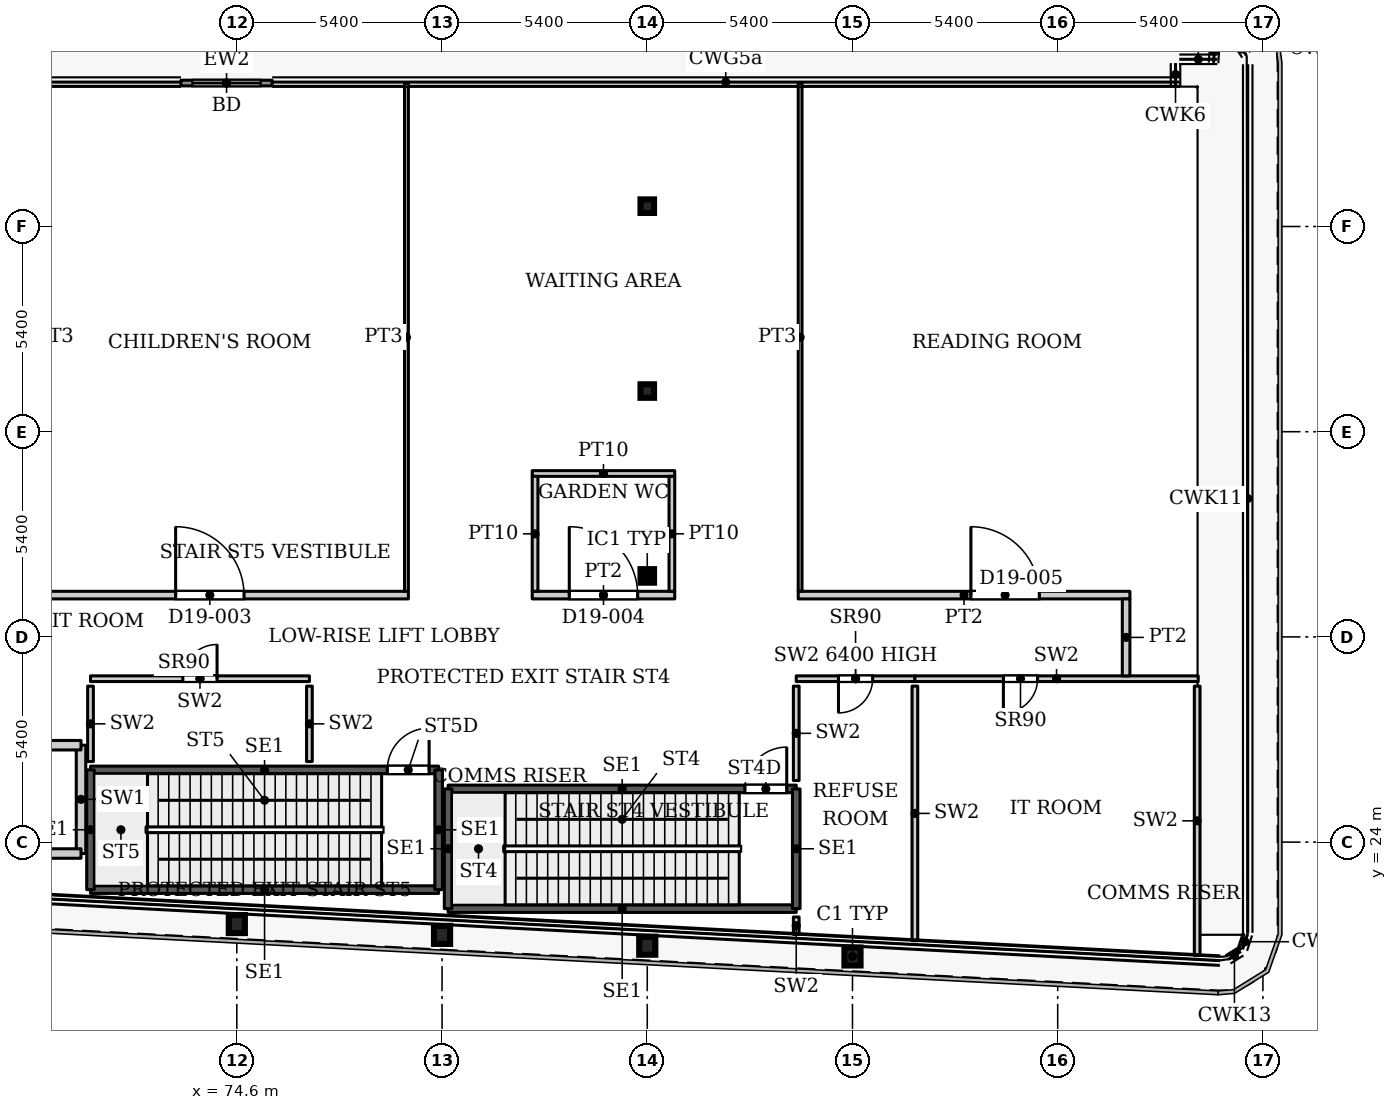
"""IFC4 building model, lengths in metres.
Left out: names, types, materials, properties, quantities, classifications, styles, units other than length and angle.
Written with IfcOpenShell. Run it as: python <this file> out.ifc"""

import sys

from ifc_helpers import new_model, si_unit, direction, frame, frame_2d, origin, origin_2d, place, context, subcontext, project, spatial, rectangle, hollow_rectangle, i_section, extrude, source, transform, mapped, element, fill, save


model = new_model("IFC4")
c1 = context("Model", 3, precision=1e-05, world=origin(), true_north=direction((0.0, 1.0)))
c2 = subcontext(c1, "Body", "Model", "MODEL_VIEW")
j1 = project(units=[si_unit("LENGTHUNIT", "METRE"), si_unit("PLANEANGLEUNIT", "RADIAN")], contexts=[c1])
p1 = place(None, origin())
s1 = spatial("IfcSite", under=j1, at=p1, CompositionType="ELEMENT")
p2 = place(p1, origin())
s2 = spatial("IfcBuilding", under=s1, at=p2, CompositionType="ELEMENT")
p3 = place(p2, frame((0.0, 0.0, 81.2)))
s3 = spatial("IfcBuildingStorey", under=s2, at=p3, CompositionType="ELEMENT", Elevation=81.2)
for number, where, z_axis, x_axis in (
    (1, (90.8, 20.99, 0.0), (0.0, 0.0, 1.0), (1.0, 0.0, 0.0)),
    (2, (85.4, 21.274, 0.0), (0.0, 0.0, 1.0), (1.0, 0.0, 0.0)),
    (3, (80.0, 21.558, 0.0), (0.0, 0.0, 1.0), (1.0, 0.0, 0.0)),
    (4, (74.6, 21.843, 0.0), (0.0, 0.0, 1.0), (1.0, 0.0, 0.0)),
):
    element("IfcColumn", number, at=place(p3, frame(where, z_axis=z_axis, x_axis=x_axis)), inside=s3, PredefinedType="COLUMN", context=c2, shape_type="SweptSolid", body=[
        extrude(i_section(OverallWidth=0.424, OverallDepth=0.474, WebThickness=0.048, FlangeThickness=0.077, FilletRadius=0.014, at=origin_2d()), origin(), (0.0, 0.0, 1.0), 7.8),
    ])
for number, where, z_axis, x_axis in (
    (5, (85.4, 31.005, 0.0), (0.0, 0.0, 1.0), (1.0, 0.0, 0.0)),
    (6, (85.4, 35.87, 0.0), (0.0, 0.0, 1.0), (1.0, 0.0, 0.0)),
    (7, (85.4, 40.735, 0.0), (0.0, 0.0, 1.0), (1.0, 0.0, 0.0)),
):
    element("IfcColumn", number, at=place(p3, frame(where, z_axis=z_axis, x_axis=x_axis)), inside=s3, PredefinedType="COLUMN", context=c2, shape_type="SweptSolid", body=[
        extrude(hollow_rectangle(XDim=0.356, YDim=0.356, WallThickness=0.016, InnerFilletRadius=0.016, OuterFilletRadius=0.032, at=origin_2d()), origin(), (0.0, 0.0, 1.0), 7.8),
    ])
p4 = place(p3, frame((73.13, 43.975, 0.0), z_axis=(0.0, 0.0, 1.0), x_axis=(1.0, 0.0, 0.0)))
e8 = element("IfcWall", 8, at=p4, inside=s3, PredefinedType="SOLIDWALL", context=c2, shape_type="SweptSolid", body=[
    extrude(rectangle(XDim=2.4, YDim=0.15, at=frame_2d((1.2, 0.0))), origin(), (0.0, 0.0, 1.0), 7.65),
])
p5 = place(p4, frame((0.3, 0.0, 0.0)))
e9 = element("IfcOpeningElement", 9, at=p5, cuts=e8, PredefinedType="OPENING", context=c2, shape_type="SweptSolid", body=[
    extrude(rectangle(XDim=1.8, YDim=2.4, at=frame_2d((0.9, 1.2))), frame((0.0, 0.085, 0.0), z_axis=(0.0, -1.0, 0.0), x_axis=(1.0, 0.0, 0.0)), (0.0, 0.0, 1.0), 0.17),
])
p6 = place(p3, frame((80.16, 22.25, 0.0), z_axis=(0.0, 0.0, 1.0), x_axis=(1.0, 0.0, 0.0)))
e10 = element("IfcWall", 10, at=p6, inside=s3, PredefinedType="SHEAR", context=c2, shape_type="SweptSolid", body=[
    extrude(rectangle(XDim=9.16, YDim=0.2, at=frame_2d((4.58, 0.0))), origin(), (0.0, 0.0, 1.0), 7.8),
])
p7 = place(p3, frame((80.16, 25.4, 0.0), z_axis=(0.0, 0.0, 1.0), x_axis=(1.0, 0.0, 0.0)))
e11 = element("IfcWall", 11, at=p7, inside=s3, PredefinedType="SHEAR", context=c2, shape_type="SweptSolid", body=[
    extrude(rectangle(XDim=9.16, YDim=0.2, at=frame_2d((4.58, 0.0))), origin(), (0.0, 0.0, 1.0), 7.8),
])
p8 = place(p7, frame((7.81, 0.0, 0.0)))
e12 = element("IfcOpeningElement", 12, at=p8, cuts=e11, PredefinedType="OPENING", context=c2, shape_type="SweptSolid", body=[
    extrude(rectangle(XDim=1.1, YDim=2.2, at=frame_2d((0.55, 1.1))), frame((0.0, 0.11, 0.0), z_axis=(0.0, -1.0, 0.0), x_axis=(1.0, 0.0, 0.0)), (0.0, 0.0, 1.0), 0.22),
])
for number, where, z_axis, x_axis in (
    (13, (80.16, 22.25, 0.0), (0.0, 0.0, 1.0), (0.0, 1.0, 0.0)),
    (14, (89.32, 22.25, 0.0), (0.0, 0.0, 1.0), (0.0, 1.0, 0.0)),
):
    element("IfcWall", number, at=place(p3, frame(where, z_axis=z_axis, x_axis=x_axis)), inside=s3, PredefinedType="SHEAR", context=c2, shape_type="SweptSolid", body=[
        extrude(rectangle(XDim=3.15, YDim=0.2, at=frame_2d((1.575, 0.0))), origin(), (0.0, 0.0, 1.0), 7.8),
    ])
p9 = place(p3, frame((70.75, 22.75, 0.0), z_axis=(0.0, 0.0, 1.0), x_axis=(1.0, 0.0, 0.0)))
e15 = element("IfcWall", 15, at=p9, inside=s3, PredefinedType="SHEAR", context=c2, shape_type="SweptSolid", body=[
    extrude(rectangle(XDim=9.16, YDim=0.2, at=frame_2d((4.58, 0.0))), origin(), (0.0, 0.0, 1.0), 7.8),
])
p10 = place(p3, frame((70.75, 25.9, 0.0), z_axis=(0.0, 0.0, 1.0), x_axis=(1.0, 0.0, 0.0)))
e16 = element("IfcWall", 16, at=p10, inside=s3, PredefinedType="SHEAR", context=c2, shape_type="SweptSolid", body=[
    extrude(rectangle(XDim=9.16, YDim=0.2, at=frame_2d((4.58, 0.0))), origin(), (0.0, 0.0, 1.0), 7.8),
])
p11 = place(p10, frame((7.81, 0.0, 0.0)))
e17 = element("IfcOpeningElement", 17, at=p11, cuts=e16, PredefinedType="OPENING", context=c2, shape_type="SweptSolid", body=[
    extrude(rectangle(XDim=1.1, YDim=2.2, at=frame_2d((0.55, 1.1))), frame((0.0, 0.11, 0.0), z_axis=(0.0, -1.0, 0.0), x_axis=(1.0, 0.0, 0.0)), (0.0, 0.0, 1.0), 0.22),
])
for number, where, z_axis, x_axis in (
    (18, (70.75, 22.75, 0.0), (0.0, 0.0, 1.0), (0.0, 1.0, 0.0)),
    (19, (79.91, 22.75, 0.0), (0.0, 0.0, 1.0), (0.0, 1.0, 0.0)),
):
    element("IfcWall", number, at=place(p3, frame(where, z_axis=z_axis, x_axis=x_axis)), inside=s3, PredefinedType="SHEAR", context=c2, shape_type="SweptSolid", body=[
        extrude(rectangle(XDim=3.15, YDim=0.2, at=frame_2d((1.575, 0.0))), origin(), (0.0, 0.0, 1.0), 7.8),
    ])
p12 = place(p3, frame((70.5, 23.7, 0.0), z_axis=(0.0, 0.0, 1.0), x_axis=(0.0, 1.0, 0.0)))
e20 = element("IfcWall", 20, at=p12, inside=s3, PredefinedType="PARTITIONING", context=c2, shape_type="SweptSolid", body=[
    extrude(rectangle(XDim=2.85, YDim=0.25, at=frame_2d((1.425, 0.0))), origin(), (0.0, 0.0, 1.0), 7.8),
])
p13 = place(p3, frame((53.4, 23.7, 0.0), z_axis=(0.0, 0.0, 1.0), x_axis=(1.0, 0.0, 0.0)))
e21 = element("IfcWall", 21, at=p13, inside=s3, PredefinedType="PARTITIONING", context=c2, shape_type="SweptSolid", body=[
    extrude(rectangle(XDim=17.1, YDim=0.25, at=frame_2d((8.55, 0.0))), origin(), (0.0, 0.0, 1.0), 7.8),
])
p14 = place(p3, frame((53.4, 26.55, 0.0), z_axis=(0.0, 0.0, 1.0), x_axis=(1.0, 0.0, 0.0)))
e22 = element("IfcWall", 22, at=p14, inside=s3, PredefinedType="PARTITIONING", context=c2, shape_type="SweptSolid", body=[
    extrude(rectangle(XDim=17.1, YDim=0.25, at=frame_2d((8.55, 0.0))), origin(), (0.0, 0.0, 1.0), 7.8),
])
p15 = place(p14, frame((0.875, 0.0, 0.0)))
e23 = element("IfcOpeningElement", 23, at=p15, cuts=e22, PredefinedType="OPENING", context=c2, shape_type="SweptSolid", body=[
    extrude(rectangle(XDim=1.1, YDim=2.2, at=frame_2d((0.55, 1.1))), frame((0.0, 0.135, 0.0), z_axis=(0.0, -1.0, 0.0), x_axis=(1.0, 0.0, 0.0)), (0.0, 0.0, 1.0), 0.27),
])
p16 = place(p14, frame((3.725, 0.0, 0.0)))
e24 = element("IfcOpeningElement", 24, at=p16, cuts=e22, PredefinedType="OPENING", context=c2, shape_type="SweptSolid", body=[
    extrude(rectangle(XDim=1.1, YDim=2.2, at=frame_2d((0.55, 1.1))), frame((0.0, 0.135, 0.0), z_axis=(0.0, -1.0, 0.0), x_axis=(1.0, 0.0, 0.0)), (0.0, 0.0, 1.0), 0.27),
])
p17 = place(p14, frame((6.575, 0.0, 0.0)))
e25 = element("IfcOpeningElement", 25, at=p17, cuts=e22, PredefinedType="OPENING", context=c2, shape_type="SweptSolid", body=[
    extrude(rectangle(XDim=1.1, YDim=2.2, at=frame_2d((0.55, 1.1))), frame((0.0, 0.135, 0.0), z_axis=(0.0, -1.0, 0.0), x_axis=(1.0, 0.0, 0.0)), (0.0, 0.0, 1.0), 0.27),
])
p18 = place(p14, frame((9.425, 0.0, 0.0)))
e26 = element("IfcOpeningElement", 26, at=p18, cuts=e22, PredefinedType="OPENING", context=c2, shape_type="SweptSolid", body=[
    extrude(rectangle(XDim=1.1, YDim=2.2, at=frame_2d((0.55, 1.1))), frame((0.0, 0.135, 0.0), z_axis=(0.0, -1.0, 0.0), x_axis=(1.0, 0.0, 0.0)), (0.0, 0.0, 1.0), 0.27),
])
p19 = place(p14, frame((12.275, 0.0, 0.0)))
e27 = element("IfcOpeningElement", 27, at=p19, cuts=e22, PredefinedType="OPENING", context=c2, shape_type="SweptSolid", body=[
    extrude(rectangle(XDim=1.1, YDim=2.2, at=frame_2d((0.55, 1.1))), frame((0.0, 0.135, 0.0), z_axis=(0.0, -1.0, 0.0), x_axis=(1.0, 0.0, 0.0)), (0.0, 0.0, 1.0), 0.27),
])
p20 = place(p14, frame((15.125, 0.0, 0.0)))
e28 = element("IfcOpeningElement", 28, at=p20, cuts=e22, PredefinedType="OPENING", context=c2, shape_type="SweptSolid", body=[
    extrude(rectangle(XDim=1.1, YDim=2.2, at=frame_2d((0.55, 1.1))), frame((0.0, 0.135, 0.0), z_axis=(0.0, -1.0, 0.0), x_axis=(1.0, 0.0, 0.0)), (0.0, 0.0, 1.0), 0.27),
])
p21 = place(p3, frame((70.75, 28.3, 0.0), z_axis=(0.0, 0.0, 1.0), x_axis=(1.0, 0.0, 0.0)))
e29 = element("IfcWall", 29, at=p21, inside=s3, PredefinedType="PARTITIONING", context=c2, shape_type="SweptSolid", body=[
    extrude(rectangle(XDim=5.76, YDim=0.15, at=frame_2d((2.88, 0.0))), origin(), (0.0, 0.0, 1.0), 7.8),
])
p22 = place(p21, frame((2.43, 0.0, 0.0)))
e30 = element("IfcOpeningElement", 30, at=p22, cuts=e29, PredefinedType="OPENING", context=c2, shape_type="SweptSolid", body=[
    extrude(rectangle(XDim=0.9, YDim=2.2, at=frame_2d((0.45, 1.1))), frame((0.0, 0.085, 0.0), z_axis=(0.0, -1.0, 0.0), x_axis=(1.0, 0.0, 0.0)), (0.0, 0.0, 1.0), 0.17),
])
for number, where, z_axis, x_axis in (
    (31, (70.75, 26.12, 0.0), (0.0, 0.0, 1.0), (0.0, 1.0, 0.0)),
    (32, (76.51, 26.12, 0.0), (0.0, 0.0, 1.0), (0.0, 1.0, 0.0)),
):
    element("IfcWall", number, at=place(p3, frame(where, z_axis=z_axis, x_axis=x_axis)), inside=s3, PredefinedType="PARTITIONING", context=c2, shape_type="SweptSolid", body=[
        extrude(rectangle(XDim=1.985, YDim=0.15, at=frame_2d((0.992, 0.0))), origin(), (0.0, 0.0, 1.0), 7.8),
    ])
p23 = place(p3, frame((89.32, 28.3, 0.0), z_axis=(0.0, 0.0, 1.0), x_axis=(1.0, 0.0, 0.0)))
e33 = element("IfcWall", 33, at=p23, inside=s3, PredefinedType="PARTITIONING", context=c2, shape_type="SweptSolid", body=[
    extrude(rectangle(XDim=3.122, YDim=0.15, at=frame_2d((1.561, 0.0))), origin(), (0.0, 0.0, 1.0), 6.4),
])
p24 = place(p23, frame((1.111, 0.0, 0.0)))
e34 = element("IfcOpeningElement", 34, at=p24, cuts=e33, PredefinedType="OPENING", context=c2, shape_type="SweptSolid", body=[
    extrude(rectangle(XDim=0.9, YDim=2.2, at=frame_2d((0.45, 1.1))), frame((0.0, 0.085, 0.0), z_axis=(0.0, -1.0, 0.0), x_axis=(1.0, 0.0, 0.0)), (0.0, 0.0, 1.0), 0.17),
])
p25 = place(p3, frame((89.32, 21.571, 0.0), z_axis=(0.0, 0.0, 1.0), x_axis=(0.0, 1.0, 0.0)))
e35 = element("IfcWall", 35, at=p25, inside=s3, PredefinedType="PARTITIONING", context=c2, shape_type="SweptSolid", body=[
    extrude(rectangle(XDim=0.459, YDim=0.15, at=frame_2d((0.229, 0.0))), origin(), (0.0, 0.0, 1.0), 7.8),
])
p26 = place(p3, frame((89.32, 25.62, 0.0), z_axis=(0.0, 0.0, 1.0), x_axis=(0.0, 1.0, 0.0)))
e36 = element("IfcWall", 36, at=p26, inside=s3, PredefinedType="PARTITIONING", context=c2, shape_type="SweptSolid", body=[
    extrude(rectangle(XDim=2.485, YDim=0.15, at=frame_2d((1.242, 0.0))), origin(), (0.0, 0.0, 1.0), 7.8),
])
p27 = place(p3, frame((92.442, 21.406, 0.0), z_axis=(0.0, 0.0, 1.0), x_axis=(0.0, 1.0, 0.0)))
e37 = element("IfcWall", 37, at=p27, inside=s3, PredefinedType="PARTITIONING", context=c2, shape_type="SweptSolid", body=[
    extrude(rectangle(XDim=6.699, YDim=0.15, at=frame_2d((3.35, 0.0))), origin(), (0.0, 0.0, 1.0), 7.8),
])
p28 = place(p3, frame((92.442, 28.3, 0.0), z_axis=(0.0, 0.0, 1.0), x_axis=(1.0, 0.0, 0.0)))
e38 = element("IfcWall", 38, at=p28, inside=s3, PredefinedType="PARTITIONING", context=c2, shape_type="SweptSolid", body=[
    extrude(rectangle(XDim=7.456, YDim=0.15, at=frame_2d((3.728, 0.0))), origin(), (0.0, 0.0, 1.0), 7.8),
])
p29 = place(p28, frame((2.329, 0.0, 0.0)))
e39 = element("IfcOpeningElement", 39, at=p29, cuts=e38, PredefinedType="OPENING", context=c2, shape_type="SweptSolid", body=[
    extrude(rectangle(XDim=0.9, YDim=2.2, at=frame_2d((0.45, 1.1))), frame((0.0, 0.085, 0.0), z_axis=(0.0, -1.0, 0.0), x_axis=(1.0, 0.0, 0.0)), (0.0, 0.0, 1.0), 0.17),
])
p30 = place(p3, frame((99.87, 21.015, 0.0), z_axis=(0.0, 0.0, 1.0), x_axis=(0.0, 1.0, 0.0)))
e40 = element("IfcWall", 40, at=p30, inside=s3, PredefinedType="PARTITIONING", context=c2, shape_type="SweptSolid", body=[
    extrude(rectangle(XDim=7.09, YDim=0.15, at=frame_2d((3.545, 0.0))), origin(), (0.0, 0.0, 1.0), 7.8),
])
p31 = place(p3, frame((53.649, 30.5, 0.0), z_axis=(0.0, 0.0, 1.0), x_axis=(1.0, 0.0, 0.0)))
e41 = element("IfcWall", 41, at=p31, inside=s3, PredefinedType="PARTITIONING", context=c2, shape_type="SweptSolid", body=[
    extrude(rectangle(XDim=25.465, YDim=0.2, at=frame_2d((12.732, 0.0))), origin(), (0.0, 0.0, 1.0), 7.5),
])
p32 = place(p31, frame((8.983, 0.0, 0.0)))
e42 = element("IfcOpeningElement", 42, at=p32, cuts=e41, PredefinedType="OPENING", context=c2, shape_type="SweptSolid", body=[
    extrude(rectangle(XDim=1.8, YDim=2.1, at=frame_2d((0.9, 1.05))), frame((0.0, 0.11, 0.0), z_axis=(0.0, -1.0, 0.0), x_axis=(1.0, 0.0, 0.0)), (0.0, 0.0, 1.0), 0.22),
])
p33 = place(p31, frame((19.341, 0.0, 0.0)))
e43 = element("IfcOpeningElement", 43, at=p33, cuts=e41, PredefinedType="OPENING", context=c2, shape_type="SweptSolid", body=[
    extrude(rectangle(XDim=1.8, YDim=2.1, at=frame_2d((0.9, 1.05))), frame((0.0, 0.11, 0.0), z_axis=(0.0, -1.0, 0.0), x_axis=(1.0, 0.0, 0.0)), (0.0, 0.0, 1.0), 0.22),
])
p34 = place(p3, frame((79.064, 30.6, 0.0), z_axis=(0.0, 0.0, 1.0), x_axis=(0.0, 1.0, 0.0)))
e44 = element("IfcWall", 44, at=p34, inside=s3, PredefinedType="PARTITIONING", context=c2, shape_type="SweptSolid", body=[
    extrude(rectangle(XDim=13.37, YDim=0.1, at=frame_2d((6.685, 0.0))), origin(), (0.0, 0.0, 1.0), 7.5),
])
p35 = place(p3, frame((82.373, 30.5, 0.0), z_axis=(0.0, 0.0, 1.0), x_axis=(1.0, 0.0, 0.0)))
e45 = element("IfcWall", 45, at=p35, inside=s3, PredefinedType="PARTITIONING", context=c2, shape_type="SweptSolid", body=[
    extrude(rectangle(XDim=3.75, YDim=0.2, at=frame_2d((1.875, 0.0))), origin(), (0.0, 0.0, 1.0), 7.5),
])
p36 = place(p35, frame((0.975, 0.0, 0.0)))
e46 = element("IfcOpeningElement", 46, at=p36, cuts=e45, PredefinedType="OPENING", context=c2, shape_type="SweptSolid", body=[
    extrude(rectangle(XDim=1.8, YDim=2.1, at=frame_2d((0.9, 1.05))), frame((0.0, 0.11, 0.0), z_axis=(0.0, -1.0, 0.0), x_axis=(1.0, 0.0, 0.0)), (0.0, 0.0, 1.0), 0.22),
])
p37 = place(p3, frame((82.373, 33.7, 0.0), z_axis=(0.0, 0.0, 1.0), x_axis=(1.0, 0.0, 0.0)))
e47 = element("IfcWall", 47, at=p37, inside=s3, PredefinedType="PARTITIONING", context=c2, shape_type="SweptSolid", body=[
    extrude(rectangle(XDim=3.75, YDim=0.15, at=frame_2d((1.875, 0.0))), origin(), (0.0, 0.0, 1.0), 7.5),
])
for number, where, z_axis, x_axis in (
    (48, (82.448, 30.6, 0.0), (0.0, 0.0, 1.0), (0.0, 1.0, 0.0)),
    (49, (86.048, 30.6, 0.0), (0.0, 0.0, 1.0), (0.0, 1.0, 0.0)),
):
    element("IfcWall", number, at=place(p3, frame(where, z_axis=z_axis, x_axis=x_axis)), inside=s3, PredefinedType="PARTITIONING", context=c2, shape_type="SweptSolid", body=[
        extrude(rectangle(XDim=3.025, YDim=0.15, at=frame_2d((1.512, 0.0))), origin(), (0.0, 0.0, 1.0), 7.5),
    ])
p38 = place(p3, frame((89.372, 30.5, 0.0), z_axis=(0.0, 0.0, 1.0), x_axis=(1.0, 0.0, 0.0)))
e50 = element("IfcWall", 50, at=p38, inside=s3, PredefinedType="PARTITIONING", context=c2, shape_type="SweptSolid", body=[
    extrude(rectangle(XDim=8.728, YDim=0.2, at=frame_2d((4.364, 0.0))), origin(), (0.0, 0.0, 1.0), 7.5),
])
p39 = place(p38, frame((4.544, 0.0, 0.0)))
e51 = element("IfcOpeningElement", 51, at=p39, cuts=e50, PredefinedType="OPENING", context=c2, shape_type="SweptSolid", body=[
    extrude(rectangle(XDim=1.8, YDim=2.1, at=frame_2d((0.9, 1.05))), frame((0.0, 0.11, 0.0), z_axis=(0.0, -1.0, 0.0), x_axis=(1.0, 0.0, 0.0)), (0.0, 0.0, 1.0), 0.22),
])
p40 = place(p3, frame((89.422, 30.6, 0.0), z_axis=(0.0, 0.0, 1.0), x_axis=(0.0, 1.0, 0.0)))
e52 = element("IfcWall", 52, at=p40, inside=s3, PredefinedType="PARTITIONING", context=c2, shape_type="SweptSolid", body=[
    extrude(rectangle(XDim=13.37, YDim=0.1, at=frame_2d((6.685, 0.0))), origin(), (0.0, 0.0, 1.0), 7.5),
])
p41 = place(p3, frame((98.0, 28.374, 0.0), z_axis=(0.0, 0.0, 1.0), x_axis=(0.0, 1.0, 0.0)))
e53 = element("IfcWall", 53, at=p41, inside=s3, PredefinedType="PARTITIONING", context=c2, shape_type="SweptSolid", body=[
    extrude(rectangle(XDim=2.026, YDim=0.2, at=frame_2d((1.013, 0.0))), origin(), (0.0, 0.0, 1.0), 7.5),
])
m1 = source(origin(), c2, "Body", "SweptSolid", [
    extrude(rectangle(XDim=1.8, YDim=2.4, at=frame_2d((0.9, 1.2))), frame((0.0, 0.025, 0.0), z_axis=(0.0, -1.0, 0.0), x_axis=(1.0, 0.0, 0.0)), (0.0, 0.0, 1.0), 0.05),
])
p42 = place(p5, origin())
e54 = element("IfcDoor", 54, at=p42, inside=s3, OperationType="SLIDING_TO_LEFT", PredefinedType="DOOR", context=c2, shape_type="MappedRepresentation", body=[
    mapped(m1, transform((0.0, 0.0, 0.0), x_axis=(1.0, 0.0, 0.0), y_axis=(0.0, 1.0, 0.0), z_axis=(0.0, 0.0, 1.0), scale=1.0)),
])
fill(e9, e54)
m2 = source(origin(), c2, "Body", "SweptSolid", [
    extrude(rectangle(XDim=0.9, YDim=2.2, at=frame_2d((0.45, 1.1))), frame((0.0, 0.025, 0.0), z_axis=(0.0, -1.0, 0.0), x_axis=(1.0, 0.0, 0.0)), (0.0, 0.0, 1.0), 0.05),
])
p43 = place(p22, origin())
e55 = element("IfcDoor", 55, at=p43, inside=s3, OperationType="SINGLE_SWING_LEFT", PredefinedType="DOOR", context=c2, shape_type="MappedRepresentation", body=[
    mapped(m2, transform((0.0, 0.0, 0.0), x_axis=(1.0, 0.0, 0.0), y_axis=(0.0, 1.0, 0.0), z_axis=(0.0, 0.0, 1.0), scale=1.0)),
])
fill(e30, e55)
p44 = place(p24, origin())
e56 = element("IfcDoor", 56, at=p44, inside=s3, OperationType="SINGLE_SWING_RIGHT", PredefinedType="DOOR", context=c2, shape_type="MappedRepresentation", body=[
    mapped(m2, transform((0.0, 0.0, 0.0), x_axis=(1.0, 0.0, 0.0), y_axis=(0.0, 1.0, 0.0), z_axis=(0.0, 0.0, 1.0), scale=1.0)),
])
fill(e34, e56)
p45 = place(p29, origin())
e57 = element("IfcDoor", 57, at=p45, inside=s3, OperationType="SINGLE_SWING_RIGHT", PredefinedType="DOOR", context=c2, shape_type="MappedRepresentation", body=[
    mapped(m2, transform((0.0, 0.0, 0.0), x_axis=(1.0, 0.0, 0.0), y_axis=(0.0, 1.0, 0.0), z_axis=(0.0, 0.0, 1.0), scale=1.0)),
])
fill(e39, e57)
m3 = source(origin(), c2, "Body", "SweptSolid", [
    extrude(rectangle(XDim=1.1, YDim=2.2, at=frame_2d((0.55, 1.1))), frame((0.0, 0.025, 0.0), z_axis=(0.0, -1.0, 0.0), x_axis=(1.0, 0.0, 0.0)), (0.0, 0.0, 1.0), 0.05),
])
p46 = place(p8, origin())
e58 = element("IfcDoor", 58, at=p46, inside=s3, OperationType="SINGLE_SWING_LEFT", PredefinedType="DOOR", context=c2, shape_type="MappedRepresentation", body=[
    mapped(m3, transform((0.0, 0.0, 0.0), x_axis=(1.0, 0.0, 0.0), y_axis=(0.0, 1.0, 0.0), z_axis=(0.0, 0.0, 1.0), scale=1.0)),
])
fill(e12, e58)
p47 = place(p11, origin())
e59 = element("IfcDoor", 59, at=p47, inside=s3, OperationType="SINGLE_SWING_LEFT", PredefinedType="DOOR", context=c2, shape_type="MappedRepresentation", body=[
    mapped(m3, transform((0.0, 0.0, 0.0), x_axis=(1.0, 0.0, 0.0), y_axis=(0.0, 1.0, 0.0), z_axis=(0.0, 0.0, 1.0), scale=1.0)),
])
fill(e17, e59)
m4 = source(origin(), c2, "Body", "SweptSolid", [
    extrude(rectangle(XDim=1.8, YDim=2.1, at=frame_2d((0.9, 1.05))), frame((0.0, 0.025, 0.0), z_axis=(0.0, -1.0, 0.0), x_axis=(1.0, 0.0, 0.0)), (0.0, 0.0, 1.0), 0.05),
])
p48 = place(p33, origin())
e60 = element("IfcDoor", 60, at=p48, inside=s3, OperationType="DOUBLE_DOOR_SINGLE_SWING", PredefinedType="DOOR", context=c2, shape_type="MappedRepresentation", body=[
    mapped(m4, transform((0.0, 0.0, 0.0), x_axis=(1.0, 0.0, 0.0), y_axis=(0.0, 1.0, 0.0), z_axis=(0.0, 0.0, 1.0), scale=1.0)),
])
fill(e43, e60)
p49 = place(p36, origin())
e61 = element("IfcDoor", 61, at=p49, inside=s3, OperationType="DOUBLE_DOOR_SINGLE_SWING", PredefinedType="DOOR", context=c2, shape_type="MappedRepresentation", body=[
    mapped(m4, transform((0.0, 0.0, 0.0), x_axis=(1.0, 0.0, 0.0), y_axis=(0.0, 1.0, 0.0), z_axis=(0.0, 0.0, 1.0), scale=1.0)),
])
fill(e46, e61)
p50 = place(p39, origin())
e62 = element("IfcDoor", 62, at=p50, inside=s3, OperationType="DOUBLE_DOOR_SINGLE_SWING", PredefinedType="DOOR", context=c2, shape_type="MappedRepresentation", body=[
    mapped(m4, transform((0.0, 0.0, 0.0), x_axis=(1.0, 0.0, 0.0), y_axis=(0.0, 1.0, 0.0), z_axis=(0.0, 0.0, 1.0), scale=1.0)),
])
fill(e51, e62)
save(model, sys.argv[1])
